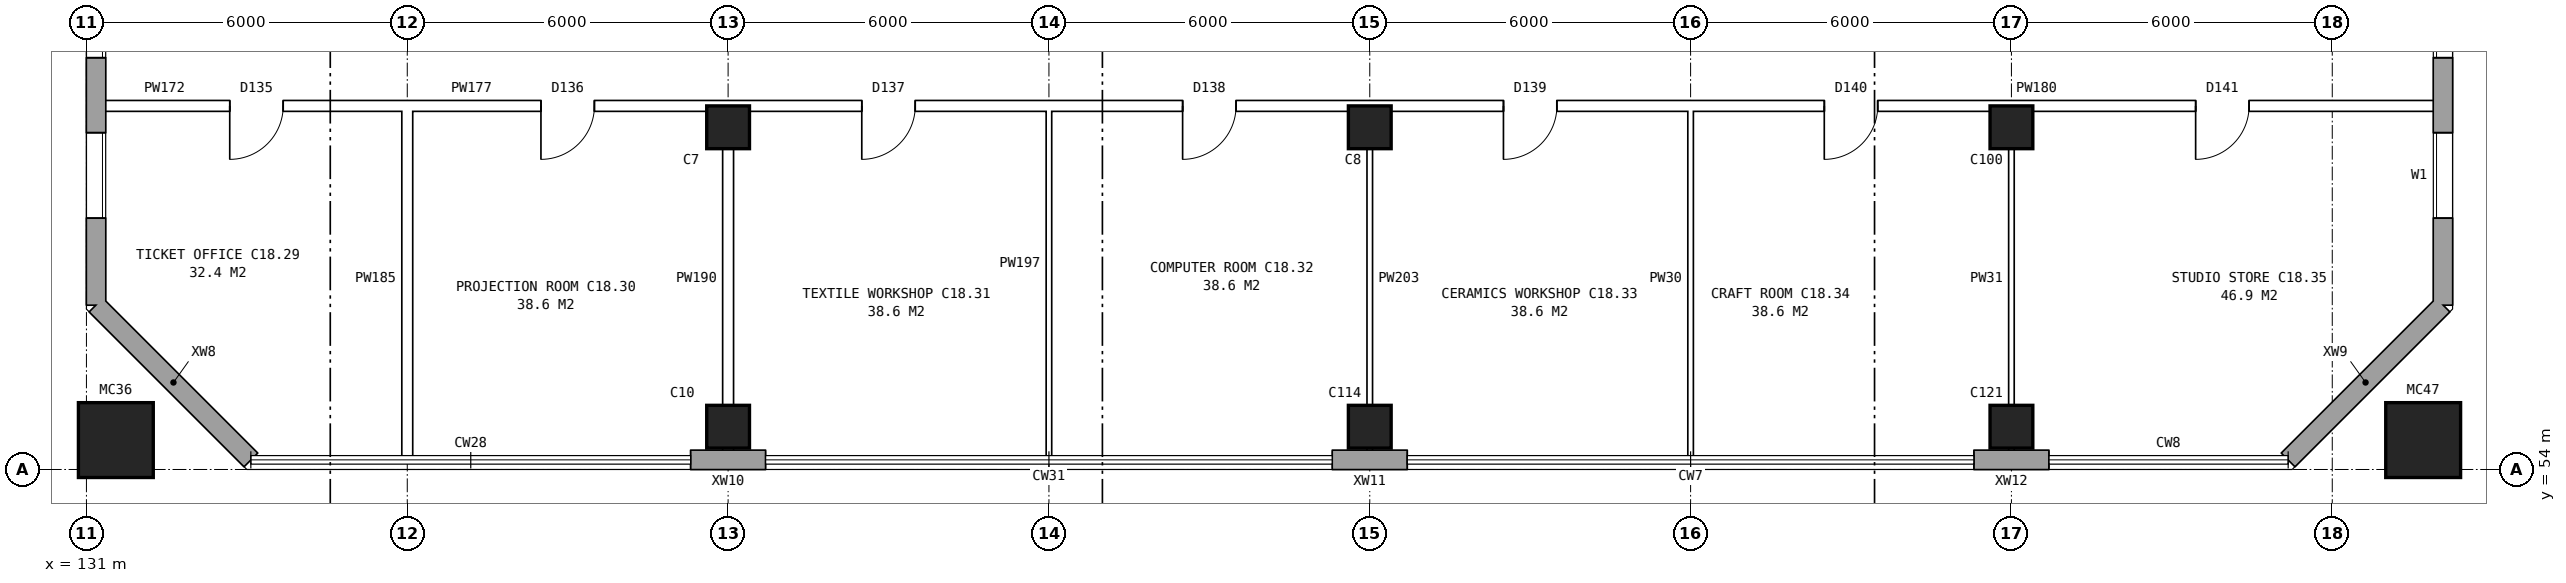
"""IFC4 building model, lengths in metres.
Left out: names, types, materials, properties, quantities, classifications, styles, units other than length and angle.
Written with IfcOpenShell. Run it as: python <this file> out.ifc"""

import sys

from ifc_helpers import new_model, si_unit, direction, frame, frame_2d, origin, origin_2d, place, context, subcontext, project, spatial, rectangle, hollow_rectangle, extrude, element, fill, save


model = new_model("IFC4")
c1 = context("Model", 3, precision=1e-05, world=origin(), true_north=direction((0.0, 1.0)))
c2 = subcontext(c1, "Body", "Model", "MODEL_VIEW")
j1 = project(units=[si_unit("LENGTHUNIT", "METRE"), si_unit("PLANEANGLEUNIT", "RADIAN")], contexts=[c1])
p1 = place(None, origin())
s1 = spatial("IfcSite", under=j1, at=p1, CompositionType="ELEMENT")
p2 = place(p1, origin())
s2 = spatial("IfcBuilding", under=s1, at=p2, CompositionType="ELEMENT")
p3 = place(p2, frame((0.0, 0.0, 67.4)))
s3 = spatial("IfcBuildingStorey", under=s2, at=p3, CompositionType="ELEMENT", Elevation=67.4)
for number, where, z_axis, x_axis in (
    (1, (143.0, 54.8, 0.0), (0.0, 0.0, 1.0), (1.0, 0.0, 0.0)),
    (2, (143.0, 60.4, 0.0), (0.0, 0.0, 1.0), (1.0, 0.0, 0.0)),
    (3, (155.0, 54.8, 0.0), (0.0, 0.0, 1.0), (1.0, 0.0, 0.0)),
    (4, (155.0, 60.4, 0.0), (0.0, 0.0, 1.0), (1.0, 0.0, 0.0)),
    (5, (167.0, 54.8, 0.0), (0.0, 0.0, 1.0), (1.0, 0.0, 0.0)),
    (6, (167.0, 60.4, 0.0), (0.0, 0.0, 1.0), (1.0, 0.0, 0.0)),
):
    element("IfcColumn", number, at=place(p3, frame(where, z_axis=z_axis, x_axis=x_axis)), inside=s3, PredefinedType="COLUMN", context=c2, shape_type="SweptSolid", body=[
        extrude(rectangle(XDim=0.8, YDim=0.8, at=origin_2d()), origin(), (0.0, 0.0, 1.0), 3.6),
    ])
for number, where, z_axis, x_axis in (
    (7, (131.55, 54.55, 0.0), (0.0, 0.0, 1.0), (1.0, 0.0, 0.0)),
    (8, (174.7, 54.55, 0.0), (0.0, 0.0, 1.0), (1.0, 0.0, 0.0)),
):
    element("IfcColumn", number, at=place(p3, frame(where, z_axis=z_axis, x_axis=x_axis)), inside=s3, PredefinedType="COLUMN", context=c2, shape_type="SweptSolid", body=[
        extrude(hollow_rectangle(XDim=1.4, YDim=1.4, WallThickness=0.075, at=origin_2d()), origin(), (0.0, 0.0, 1.0), 4.2),
    ])
p4 = place(p3, frame((131.18, 57.075, 0.0), z_axis=(0.0, 0.0, 1.0), x_axis=(0.707106781187, -0.707106781187, 0.0)))
e9 = element("IfcWall", 9, at=p4, inside=s3, PredefinedType="STANDARD", context=c2, shape_type="SweptSolid", body=[
    extrude(rectangle(XDim=4.094, YDim=0.36, at=frame_2d((2.047, 0.0))), origin(), (0.0, 0.0, 1.0), 3.6),
])
for number, where, z_axis, x_axis in (
    (10, (142.3, 54.18, 0.0), (0.0, 0.0, 1.0), (1.0, 0.0, 0.0)),
    (11, (154.3, 54.18, 0.0), (0.0, 0.0, 1.0), (1.0, 0.0, 0.0)),
    (12, (166.3, 54.18, 0.0), (0.0, 0.0, 1.0), (1.0, 0.0, 0.0)),
):
    element("IfcWall", number, at=place(p3, frame(where, z_axis=z_axis, x_axis=x_axis)), inside=s3, PredefinedType="STANDARD", context=c2, shape_type="SweptSolid", body=[
        extrude(rectangle(XDim=1.4, YDim=0.36, at=frame_2d((0.7, 0.0))), origin(), (0.0, 0.0, 1.0), 3.6),
    ])
p5 = place(p3, frame((172.175, 54.18, 0.0), z_axis=(0.0, 0.0, 1.0), x_axis=(0.707106781187, 0.707106781187, 0.0)))
e13 = element("IfcWall", 13, at=p5, inside=s3, PredefinedType="STANDARD", context=c2, shape_type="SweptSolid", body=[
    extrude(rectangle(XDim=4.094, YDim=0.36, at=frame_2d((2.047, 0.0))), origin(), (0.0, 0.0, 1.0), 3.6),
])
p6 = place(p3, frame((175.07, 57.075, 0.0), z_axis=(0.0, 0.0, 1.0), x_axis=(0.0, 1.0, 0.0)))
e14 = element("IfcWall", 14, at=p6, inside=s3, PredefinedType="STANDARD", context=c2, shape_type="SweptSolid", body=[
    extrude(rectangle(XDim=25.851, YDim=0.36, at=frame_2d((12.925, 0.0))), origin(), (0.0, 0.0, 1.0), 3.6),
])
p7 = place(p6, frame((1.625, 0.0, 0.8)))
e15 = element("IfcOpeningElement", 15, at=p7, cuts=e14, PredefinedType="OPENING", context=c2, shape_type="SweptSolid", body=[
    extrude(rectangle(XDim=1.6, YDim=1.8, at=frame_2d((0.8, 0.9))), frame((0.0, 0.19, 0.0), z_axis=(0.0, -1.0, 0.0), x_axis=(1.0, 0.0, 0.0)), (0.0, 0.0, 1.0), 0.38),
])
p8 = place(p6, frame((4.625, 0.0, 0.8)))
e16 = element("IfcOpeningElement", 16, at=p8, cuts=e14, PredefinedType="OPENING", context=c2, shape_type="SweptSolid", body=[
    extrude(rectangle(XDim=1.6, YDim=1.8, at=frame_2d((0.8, 0.9))), frame((0.0, 0.19, 0.0), z_axis=(0.0, -1.0, 0.0), x_axis=(1.0, 0.0, 0.0)), (0.0, 0.0, 1.0), 0.38),
])
p9 = place(p6, frame((7.625, 0.0, 0.8)))
e17 = element("IfcOpeningElement", 17, at=p9, cuts=e14, PredefinedType="OPENING", context=c2, shape_type="SweptSolid", body=[
    extrude(rectangle(XDim=1.6, YDim=1.8, at=frame_2d((0.8, 0.9))), frame((0.0, 0.19, 0.0), z_axis=(0.0, -1.0, 0.0), x_axis=(1.0, 0.0, 0.0)), (0.0, 0.0, 1.0), 0.38),
])
p10 = place(p6, frame((10.625, 0.0, 0.8)))
e18 = element("IfcOpeningElement", 18, at=p10, cuts=e14, PredefinedType="OPENING", context=c2, shape_type="SweptSolid", body=[
    extrude(rectangle(XDim=1.6, YDim=1.8, at=frame_2d((0.8, 0.9))), frame((0.0, 0.19, 0.0), z_axis=(0.0, -1.0, 0.0), x_axis=(1.0, 0.0, 0.0)), (0.0, 0.0, 1.0), 0.38),
])
p11 = place(p6, frame((13.625, 0.0, 0.8)))
e19 = element("IfcOpeningElement", 19, at=p11, cuts=e14, PredefinedType="OPENING", context=c2, shape_type="SweptSolid", body=[
    extrude(rectangle(XDim=1.6, YDim=1.8, at=frame_2d((0.8, 0.9))), frame((0.0, 0.19, 0.0), z_axis=(0.0, -1.0, 0.0), x_axis=(1.0, 0.0, 0.0)), (0.0, 0.0, 1.0), 0.38),
])
p12 = place(p6, frame((16.625, 0.0, 0.8)))
e20 = element("IfcOpeningElement", 20, at=p12, cuts=e14, PredefinedType="OPENING", context=c2, shape_type="SweptSolid", body=[
    extrude(rectangle(XDim=1.6, YDim=1.8, at=frame_2d((0.8, 0.9))), frame((0.0, 0.19, 0.0), z_axis=(0.0, -1.0, 0.0), x_axis=(1.0, 0.0, 0.0)), (0.0, 0.0, 1.0), 0.38),
])
p13 = place(p6, frame((19.625, 0.0, 0.8)))
e21 = element("IfcOpeningElement", 21, at=p13, cuts=e14, PredefinedType="OPENING", context=c2, shape_type="SweptSolid", body=[
    extrude(rectangle(XDim=1.6, YDim=1.8, at=frame_2d((0.8, 0.9))), frame((0.0, 0.19, 0.0), z_axis=(0.0, -1.0, 0.0), x_axis=(1.0, 0.0, 0.0)), (0.0, 0.0, 1.0), 0.38),
])
p14 = place(p6, frame((22.625, 0.0, 0.8)))
e22 = element("IfcOpeningElement", 22, at=p14, cuts=e14, PredefinedType="OPENING", context=c2, shape_type="SweptSolid", body=[
    extrude(rectangle(XDim=1.6, YDim=1.8, at=frame_2d((0.8, 0.9))), frame((0.0, 0.19, 0.0), z_axis=(0.0, -1.0, 0.0), x_axis=(1.0, 0.0, 0.0)), (0.0, 0.0, 1.0), 0.38),
])
p15 = place(p3, frame((131.18, 82.925, 0.0), z_axis=(0.0, 0.0, 1.0), x_axis=(0.0, -1.0, 0.0)))
e23 = element("IfcWall", 23, at=p15, inside=s3, PredefinedType="STANDARD", context=c2, shape_type="SweptSolid", body=[
    extrude(rectangle(XDim=25.851, YDim=0.36, at=frame_2d((12.925, 0.0))), origin(), (0.0, 0.0, 1.0), 3.6),
])
p16 = place(p15, frame((1.625, 0.0, 0.8)))
e24 = element("IfcOpeningElement", 24, at=p16, cuts=e23, PredefinedType="OPENING", context=c2, shape_type="SweptSolid", body=[
    extrude(rectangle(XDim=1.6, YDim=1.8, at=frame_2d((0.8, 0.9))), frame((0.0, 0.19, 0.0), z_axis=(0.0, -1.0, 0.0), x_axis=(1.0, 0.0, 0.0)), (0.0, 0.0, 1.0), 0.38),
])
p17 = place(p15, frame((4.625, 0.0, 0.8)))
e25 = element("IfcOpeningElement", 25, at=p17, cuts=e23, PredefinedType="OPENING", context=c2, shape_type="SweptSolid", body=[
    extrude(rectangle(XDim=1.6, YDim=1.8, at=frame_2d((0.8, 0.9))), frame((0.0, 0.19, 0.0), z_axis=(0.0, -1.0, 0.0), x_axis=(1.0, 0.0, 0.0)), (0.0, 0.0, 1.0), 0.38),
])
p18 = place(p15, frame((19.625, 0.0, 0.8)))
e26 = element("IfcOpeningElement", 26, at=p18, cuts=e23, PredefinedType="OPENING", context=c2, shape_type="SweptSolid", body=[
    extrude(rectangle(XDim=1.6, YDim=1.8, at=frame_2d((0.8, 0.9))), frame((0.0, 0.19, 0.0), z_axis=(0.0, -1.0, 0.0), x_axis=(1.0, 0.0, 0.0)), (0.0, 0.0, 1.0), 0.38),
])
p19 = place(p15, frame((22.625, 0.0, 0.8)))
e27 = element("IfcOpeningElement", 27, at=p19, cuts=e23, PredefinedType="OPENING", context=c2, shape_type="SweptSolid", body=[
    extrude(rectangle(XDim=1.6, YDim=1.8, at=frame_2d((0.8, 0.9))), frame((0.0, 0.19, 0.0), z_axis=(0.0, -1.0, 0.0), x_axis=(1.0, 0.0, 0.0)), (0.0, 0.0, 1.0), 0.38),
])
p20 = place(p3, frame((136.9, 60.8, 0.0), z_axis=(0.0, 0.0, 1.0), x_axis=(1.0, 0.0, 0.0)))
e28 = element("IfcWall", 28, at=p20, inside=s3, PredefinedType="PARTITIONING", context=c2, shape_type="SweptSolid", body=[
    extrude(rectangle(XDim=6.2, YDim=0.2, at=frame_2d((3.1, 0.0))), origin(), (0.0, 0.0, 1.0), 3.6),
])
p21 = place(p20, frame((2.6, 0.0, 0.0)))
e29 = element("IfcOpeningElement", 29, at=p21, cuts=e28, PredefinedType="OPENING", context=c2, shape_type="SweptSolid", body=[
    extrude(rectangle(XDim=1.0, YDim=2.1, at=frame_2d((0.5, 1.05))), frame((0.0, 0.11, 0.0), z_axis=(0.0, -1.0, 0.0), x_axis=(1.0, 0.0, 0.0)), (0.0, 0.0, 1.0), 0.22),
])
p22 = place(p3, frame((131.24, 60.8, 0.0), z_axis=(0.0, 0.0, 1.0), x_axis=(1.0, 0.0, 0.0)))
e30 = element("IfcWall", 30, at=p22, inside=s3, PredefinedType="PARTITIONING", context=c2, shape_type="SweptSolid", body=[
    extrude(rectangle(XDim=5.86, YDim=0.2, at=frame_2d((2.93, 0.0))), origin(), (0.0, 0.0, 1.0), 3.6),
])
p23 = place(p22, frame((2.44, 0.0, 0.0)))
e31 = element("IfcOpeningElement", 31, at=p23, cuts=e30, PredefinedType="OPENING", context=c2, shape_type="SweptSolid", body=[
    extrude(rectangle(XDim=1.0, YDim=2.1, at=frame_2d((0.5, 1.05))), frame((0.0, 0.11, 0.0), z_axis=(0.0, -1.0, 0.0), x_axis=(1.0, 0.0, 0.0)), (0.0, 0.0, 1.0), 0.22),
])
p24 = place(p3, frame((142.9, 60.8, 0.0), z_axis=(0.0, 0.0, 1.0), x_axis=(1.0, 0.0, 0.0)))
e32 = element("IfcWall", 32, at=p24, inside=s3, PredefinedType="PARTITIONING", context=c2, shape_type="SweptSolid", body=[
    extrude(rectangle(XDim=32.11, YDim=0.2, at=frame_2d((16.055, 0.0))), origin(), (0.0, 0.0, 1.0), 3.6),
])
p25 = place(p24, frame((2.6, 0.0, 0.0)))
e33 = element("IfcOpeningElement", 33, at=p25, cuts=e32, PredefinedType="OPENING", context=c2, shape_type="SweptSolid", body=[
    extrude(rectangle(XDim=1.0, YDim=2.1, at=frame_2d((0.5, 1.05))), frame((0.0, 0.11, 0.0), z_axis=(0.0, -1.0, 0.0), x_axis=(1.0, 0.0, 0.0)), (0.0, 0.0, 1.0), 0.22),
])
p26 = place(p24, frame((8.6, 0.0, 0.0)))
e34 = element("IfcOpeningElement", 34, at=p26, cuts=e32, PredefinedType="OPENING", context=c2, shape_type="SweptSolid", body=[
    extrude(rectangle(XDim=1.0, YDim=2.1, at=frame_2d((0.5, 1.05))), frame((0.0, 0.11, 0.0), z_axis=(0.0, -1.0, 0.0), x_axis=(1.0, 0.0, 0.0)), (0.0, 0.0, 1.0), 0.22),
])
p27 = place(p24, frame((14.6, 0.0, 0.0)))
e35 = element("IfcOpeningElement", 35, at=p27, cuts=e32, PredefinedType="OPENING", context=c2, shape_type="SweptSolid", body=[
    extrude(rectangle(XDim=1.0, YDim=2.1, at=frame_2d((0.5, 1.05))), frame((0.0, 0.11, 0.0), z_axis=(0.0, -1.0, 0.0), x_axis=(1.0, 0.0, 0.0)), (0.0, 0.0, 1.0), 0.22),
])
p28 = place(p24, frame((20.6, 0.0, 0.0)))
e36 = element("IfcOpeningElement", 36, at=p28, cuts=e32, PredefinedType="OPENING", context=c2, shape_type="SweptSolid", body=[
    extrude(rectangle(XDim=1.0, YDim=2.1, at=frame_2d((0.5, 1.05))), frame((0.0, 0.11, 0.0), z_axis=(0.0, -1.0, 0.0), x_axis=(1.0, 0.0, 0.0)), (0.0, 0.0, 1.0), 0.22),
])
p29 = place(p24, frame((27.545, 0.0, 0.0)))
e37 = element("IfcOpeningElement", 37, at=p29, cuts=e32, PredefinedType="OPENING", context=c2, shape_type="SweptSolid", body=[
    extrude(rectangle(XDim=1.0, YDim=2.1, at=frame_2d((0.5, 1.05))), frame((0.0, 0.11, 0.0), z_axis=(0.0, -1.0, 0.0), x_axis=(1.0, 0.0, 0.0)), (0.0, 0.0, 1.0), 0.22),
])
for number, where, z_axis, x_axis in (
    (38, (137.0, 54.24, 0.0), (0.0, 0.0, 1.0), (0.0, 1.0, 0.0)),
    (39, (143.0, 54.24, 0.0), (0.0, 0.0, 1.0), (0.0, 1.0, 0.0)),
):
    element("IfcWall", number, at=place(p3, frame(where, z_axis=z_axis, x_axis=x_axis)), inside=s3, PredefinedType="PARTITIONING", context=c2, shape_type="SweptSolid", body=[
        extrude(rectangle(XDim=6.66, YDim=0.2, at=frame_2d((3.33, 0.0))), origin(), (0.0, 0.0, 1.0), 3.6),
    ])
for number, where, z_axis, x_axis in (
    (40, (149.0, 54.24, 0.0), (0.0, 0.0, 1.0), (0.0, 1.0, 0.0)),
    (41, (155.0, 54.24, 0.0), (0.0, 0.0, 1.0), (0.0, 1.0, 0.0)),
    (42, (161.0, 54.24, 0.0), (0.0, 0.0, 1.0), (0.0, 1.0, 0.0)),
    (43, (167.0, 54.24, 0.0), (0.0, 0.0, 1.0), (0.0, 1.0, 0.0)),
):
    element("IfcWall", number, at=place(p3, frame(where, z_axis=z_axis, x_axis=x_axis)), inside=s3, PredefinedType="PARTITIONING", context=c2, shape_type="SweptSolid", body=[
        extrude(rectangle(XDim=6.66, YDim=0.1, at=frame_2d((3.33, 0.0))), origin(), (0.0, 0.0, 1.0), 3.6),
    ])
p30 = place(p7, origin())
e44 = element("IfcWindow", 44, at=p30, inside=s3, PartitioningType="SINGLE_PANEL", PredefinedType="WINDOW", context=c2, shape_type="SweptSolid", body=[
    extrude(rectangle(XDim=1.6, YDim=1.8, at=frame_2d((0.8, 0.9))), frame((0.0, 0.15, 0.0), z_axis=(0.0, -1.0, 0.0), x_axis=(1.0, 0.0, 0.0)), (0.0, 0.0, 1.0), 0.06),
])
fill(e15, e44)
p31 = place(p8, origin())
e45 = element("IfcWindow", 45, at=p31, inside=s3, PartitioningType="SINGLE_PANEL", PredefinedType="WINDOW", context=c2, shape_type="SweptSolid", body=[
    extrude(rectangle(XDim=1.6, YDim=1.8, at=frame_2d((0.8, 0.9))), frame((0.0, 0.15, 0.0), z_axis=(0.0, -1.0, 0.0), x_axis=(1.0, 0.0, 0.0)), (0.0, 0.0, 1.0), 0.06),
])
fill(e16, e45)
p32 = place(p18, origin())
e46 = element("IfcWindow", 46, at=p32, inside=s3, PartitioningType="SINGLE_PANEL", PredefinedType="WINDOW", context=c2, shape_type="SweptSolid", body=[
    extrude(rectangle(XDim=1.6, YDim=1.8, at=frame_2d((0.8, 0.9))), frame((0.0, 0.15, 0.0), z_axis=(0.0, -1.0, 0.0), x_axis=(1.0, 0.0, 0.0)), (0.0, 0.0, 1.0), 0.06),
])
fill(e26, e46)
p33 = place(p19, origin())
e47 = element("IfcWindow", 47, at=p33, inside=s3, PartitioningType="SINGLE_PANEL", PredefinedType="WINDOW", context=c2, shape_type="SweptSolid", body=[
    extrude(rectangle(XDim=1.6, YDim=1.8, at=frame_2d((0.8, 0.9))), frame((0.0, 0.15, 0.0), z_axis=(0.0, -1.0, 0.0), x_axis=(1.0, 0.0, 0.0)), (0.0, 0.0, 1.0), 0.06),
])
fill(e27, e47)
p34 = place(p21, frame((1.0, 0.0, 0.0), z_axis=(0.0, 0.0, 1.0), x_axis=(-1.0, 0.0, 0.0)))
e48 = element("IfcDoor", 48, at=p34, inside=s3, OperationType="SINGLE_SWING_RIGHT", PredefinedType="DOOR", context=c2, shape_type="SweptSolid", body=[
    extrude(rectangle(XDim=1.0, YDim=2.1, at=frame_2d((0.5, 1.05))), frame((0.0, 0.025, 0.0), z_axis=(0.0, -1.0, 0.0), x_axis=(1.0, 0.0, 0.0)), (0.0, 0.0, 1.0), 0.05),
])
fill(e29, e48)
p35 = place(p23, frame((1.0, 0.0, 0.0), z_axis=(0.0, 0.0, 1.0), x_axis=(-1.0, 0.0, 0.0)))
e49 = element("IfcDoor", 49, at=p35, inside=s3, OperationType="SINGLE_SWING_RIGHT", PredefinedType="DOOR", context=c2, shape_type="SweptSolid", body=[
    extrude(rectangle(XDim=1.0, YDim=2.1, at=frame_2d((0.5, 1.05))), frame((0.0, 0.025, 0.0), z_axis=(0.0, -1.0, 0.0), x_axis=(1.0, 0.0, 0.0)), (0.0, 0.0, 1.0), 0.05),
])
fill(e31, e49)
p36 = place(p25, frame((1.0, 0.0, 0.0), z_axis=(0.0, 0.0, 1.0), x_axis=(-1.0, 0.0, 0.0)))
e50 = element("IfcDoor", 50, at=p36, inside=s3, OperationType="SINGLE_SWING_RIGHT", PredefinedType="DOOR", context=c2, shape_type="SweptSolid", body=[
    extrude(rectangle(XDim=1.0, YDim=2.1, at=frame_2d((0.5, 1.05))), frame((0.0, 0.025, 0.0), z_axis=(0.0, -1.0, 0.0), x_axis=(1.0, 0.0, 0.0)), (0.0, 0.0, 1.0), 0.05),
])
fill(e33, e50)
p37 = place(p26, frame((1.0, 0.0, 0.0), z_axis=(0.0, 0.0, 1.0), x_axis=(-1.0, 0.0, 0.0)))
e51 = element("IfcDoor", 51, at=p37, inside=s3, OperationType="SINGLE_SWING_RIGHT", PredefinedType="DOOR", context=c2, shape_type="SweptSolid", body=[
    extrude(rectangle(XDim=1.0, YDim=2.1, at=frame_2d((0.5, 1.05))), frame((0.0, 0.025, 0.0), z_axis=(0.0, -1.0, 0.0), x_axis=(1.0, 0.0, 0.0)), (0.0, 0.0, 1.0), 0.05),
])
fill(e34, e51)
p38 = place(p27, frame((1.0, 0.0, 0.0), z_axis=(0.0, 0.0, 1.0), x_axis=(-1.0, 0.0, 0.0)))
e52 = element("IfcDoor", 52, at=p38, inside=s3, OperationType="SINGLE_SWING_RIGHT", PredefinedType="DOOR", context=c2, shape_type="SweptSolid", body=[
    extrude(rectangle(XDim=1.0, YDim=2.1, at=frame_2d((0.5, 1.05))), frame((0.0, 0.025, 0.0), z_axis=(0.0, -1.0, 0.0), x_axis=(1.0, 0.0, 0.0)), (0.0, 0.0, 1.0), 0.05),
])
fill(e35, e52)
p39 = place(p28, frame((1.0, 0.0, 0.0), z_axis=(0.0, 0.0, 1.0), x_axis=(-1.0, 0.0, 0.0)))
e53 = element("IfcDoor", 53, at=p39, inside=s3, OperationType="SINGLE_SWING_RIGHT", PredefinedType="DOOR", context=c2, shape_type="SweptSolid", body=[
    extrude(rectangle(XDim=1.0, YDim=2.1, at=frame_2d((0.5, 1.05))), frame((0.0, 0.025, 0.0), z_axis=(0.0, -1.0, 0.0), x_axis=(1.0, 0.0, 0.0)), (0.0, 0.0, 1.0), 0.05),
])
fill(e36, e53)
p40 = place(p29, frame((1.0, 0.0, 0.0), z_axis=(0.0, 0.0, 1.0), x_axis=(-1.0, 0.0, 0.0)))
e54 = element("IfcDoor", 54, at=p40, inside=s3, OperationType="SINGLE_SWING_RIGHT", PredefinedType="DOOR", context=c2, shape_type="SweptSolid", body=[
    extrude(rectangle(XDim=1.0, YDim=2.1, at=frame_2d((0.5, 1.05))), frame((0.0, 0.025, 0.0), z_axis=(0.0, -1.0, 0.0), x_axis=(1.0, 0.0, 0.0)), (0.0, 0.0, 1.0), 0.05),
])
fill(e37, e54)
save(model, sys.argv[1])
